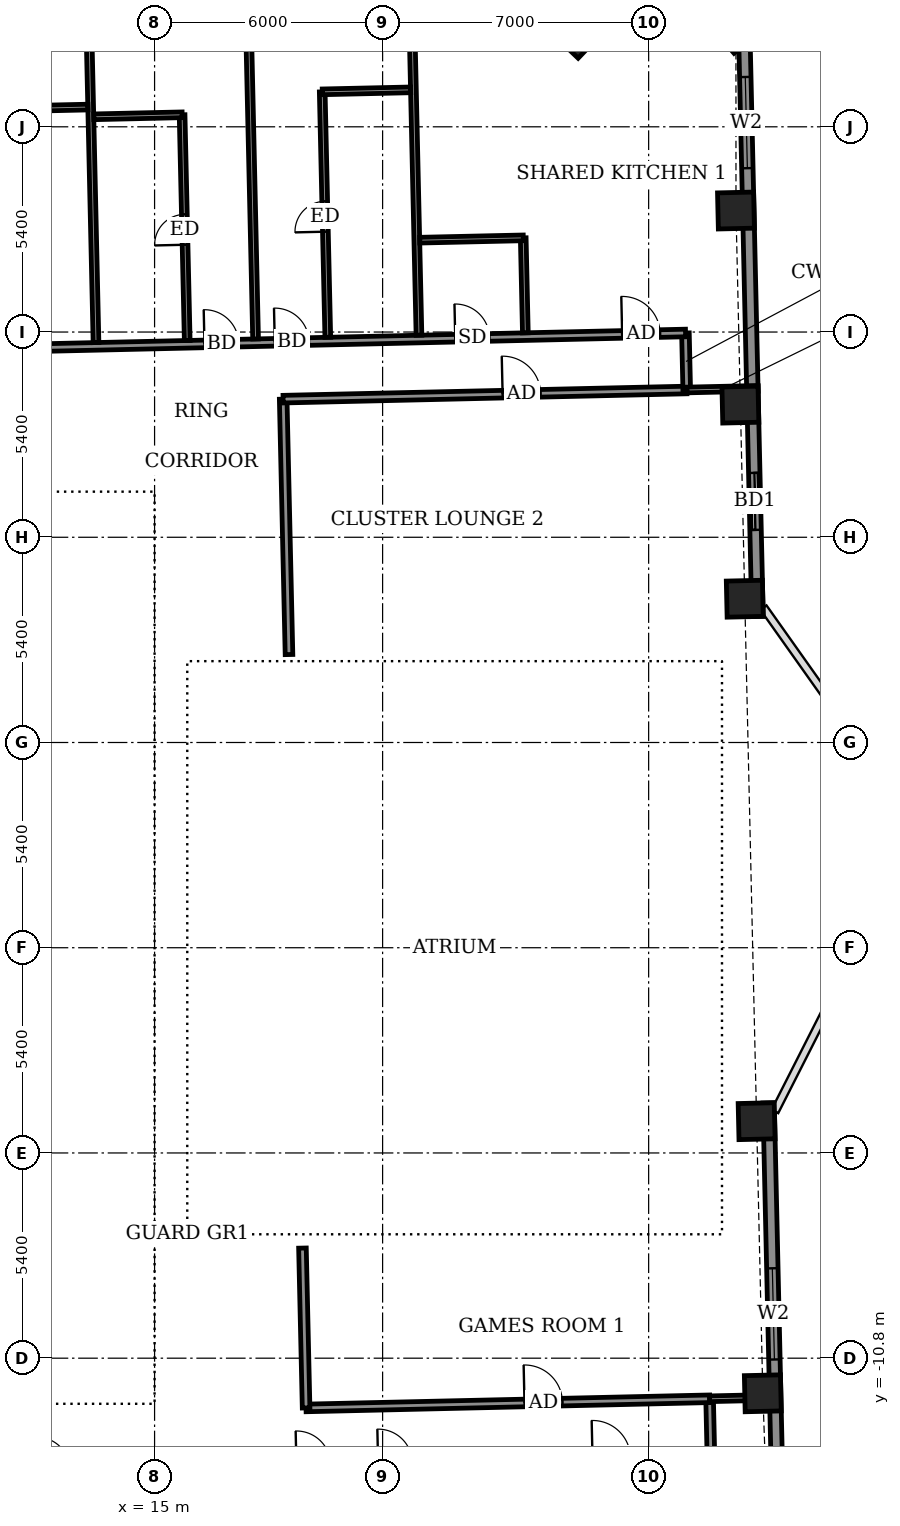
"""IFC4 building model, lengths in metres.
Left out: names, types, materials, properties, quantities, classifications, styles, units other than length and angle.
Written with IfcOpenShell. Run it as: python <this file> out.ifc"""

import sys

from ifc_helpers import new_model, si_unit, direction, frame, frame_2d, origin, origin_2d, place, context, subcontext, project, spatial, rectangle, extrude, element, fill, save


model = new_model("IFC4")
c1 = context("Model", 3, precision=1e-05, world=origin(), true_north=direction((0.0, 1.0)))
c2 = subcontext(c1, "Body", "Model", "MODEL_VIEW")
j1 = project(units=[si_unit("LENGTHUNIT", "METRE"), si_unit("PLANEANGLEUNIT", "RADIAN")], contexts=[c1])
p1 = place(None, origin())
s1 = spatial("IfcSite", under=j1, at=p1, CompositionType="ELEMENT")
p2 = place(p1, origin())
s2 = spatial("IfcBuilding", under=s1, at=p2, CompositionType="ELEMENT")
p3 = place(p2, frame((0.0, 0.0, 290.7)))
s3 = spatial("IfcBuildingStorey", under=s2, at=p3, CompositionType="ELEMENT", Elevation=290.7)
for number, where, z_axis, x_axis in (
    (1, (31.004, -11.724, -0.55), (0.0, 0.0, 1.0), (-0.023, 1.0, 0.0)),
    (2, (30.841, -4.564, -0.55), (0.0, 0.0, 1.0), (-0.023, 1.0, 0.0)),
    (3, (30.529, 9.183, -0.55), (0.0, 0.0, 1.0), (-0.023, 1.0, 0.0)),
    (4, (30.414, 14.29, -0.55), (0.0, 0.0, 1.0), (-0.023, 1.0, 0.0)),
    (5, (30.298, 19.397, -0.55), (0.0, 0.0, 1.0), (-0.023, 1.0, 0.0)),
    (6, (30.297, 24.205, -0.55), (0.0, 0.0, 1.0), (-0.652, 0.758, 0.0)),
    (7, (26.13, 24.077, -0.55), (0.0, 0.0, 1.0), (-0.723, 0.691, 0.0)),
):
    element("IfcColumn", number, at=place(p3, frame(where, z_axis=z_axis, x_axis=x_axis)), inside=s3, PredefinedType="COLUMN", context=c2, shape_type="SweptSolid", body=[
        extrude(rectangle(XDim=0.95, YDim=0.95, at=origin_2d()), origin(), (0.0, 0.0, 1.0), 3.6),
    ])
p4 = place(p3, frame((31.488, -18.727, 0.0), z_axis=(0.0, 0.0, 1.0), x_axis=(-0.022666132143, 0.999743090226, 0.0)))
e8 = element("IfcWall", 8, at=p4, inside=s3, PredefinedType="SOLIDWALL", context=c2, shape_type="SweptSolid", body=[
    extrude(rectangle(XDim=14.649, YDim=0.3, at=frame_2d((7.324, 0.0))), origin(), (0.0, 0.0, 1.0), 2.5),
])
p5 = place(p4, frame((2.915, 0.0, 0.0)))
e9 = element("IfcOpeningElement", 9, at=p5, cuts=e8, PredefinedType="OPENING", context=c2, shape_type="SweptSolid", body=[
    extrude(rectangle(XDim=1.5, YDim=2.4, at=frame_2d((0.75, 1.2))), frame((0.0, 0.16, 0.0), z_axis=(0.0, -1.0, 0.0), x_axis=(1.0, 0.0, 0.0)), (0.0, 0.0, 1.0), 0.32),
])
p6 = place(p4, frame((7.895, 0.0, 0.9)))
e10 = element("IfcOpeningElement", 10, at=p6, cuts=e8, PredefinedType="OPENING", context=c2, shape_type="SweptSolid", body=[
    extrude(rectangle(XDim=2.4, YDim=1.5, at=frame_2d((1.2, 0.75))), frame((0.0, 0.16, 0.0), z_axis=(0.0, -1.0, 0.0), x_axis=(1.0, 0.0, 0.0)), (0.0, 0.0, 1.0), 0.32),
])
p7 = place(p3, frame((30.865, 8.716, 0.0), z_axis=(0.0, 0.0, 1.0), x_axis=(-0.022682425427, 0.999742720692, 0.0)))
e11 = element("IfcWall", 11, at=p7, inside=s3, PredefinedType="SOLIDWALL", context=c2, shape_type="SweptSolid", body=[
    extrude(rectangle(XDim=15.65, YDim=0.3, at=frame_2d((7.825, 0.0))), origin(), (0.0, 0.0, 1.0), 2.55),
])
p8 = place(p7, frame((2.279, 0.0, 0.0)))
e12 = element("IfcOpeningElement", 12, at=p8, cuts=e11, PredefinedType="OPENING", context=c2, shape_type="SweptSolid", body=[
    extrude(rectangle(XDim=1.5, YDim=2.4, at=frame_2d((0.75, 1.2))), frame((0.0, 0.16, 0.0), z_axis=(0.0, -1.0, 0.0), x_axis=(1.0, 0.0, 0.0)), (0.0, 0.0, 1.0), 0.32),
])
p9 = place(p7, frame((11.798, 0.0, 0.9)))
e13 = element("IfcOpeningElement", 13, at=p9, cuts=e11, PredefinedType="OPENING", context=c2, shape_type="SweptSolid", body=[
    extrude(rectangle(XDim=2.4, YDim=1.5, at=frame_2d((1.2, 0.75))), frame((0.0, 0.16, 0.0), z_axis=(0.0, -1.0, 0.0), x_axis=(1.0, 0.0, 0.0)), (0.0, 0.0, 1.0), 0.32),
])
p10 = place(p3, frame((29.638, -13.368, 0.0), z_axis=(0.0, 0.0, 1.0), x_axis=(-0.022617910375, 0.999744182344, 0.0)))
e14 = element("IfcWall", 14, at=p10, inside=s3, PredefinedType="PARTITIONING", context=c2, shape_type="SweptSolid", body=[
    extrude(rectangle(XDim=1.5, YDim=0.2, at=frame_2d((0.75, 0.0))), origin(), (0.0, 0.0, 1.0), 3.05),
])
p11 = place(p3, frame((18.985, -12.109, 0.0), z_axis=(0.0, 0.0, 1.0), x_axis=(0.999742771882, 0.022680169073, 0.0)))
e15 = element("IfcWall", 15, at=p11, inside=s3, PredefinedType="PARTITIONING", context=c2, shape_type="SweptSolid", body=[
    extrude(rectangle(XDim=10.625, YDim=0.2, at=frame_2d((5.312, 0.0))), origin(), (0.0, 0.0, 1.0), 3.05),
])
p12 = place(p11, frame((5.75, 0.0, 0.0)))
e16 = element("IfcOpeningElement", 16, at=p12, cuts=e15, PredefinedType="OPENING", context=c2, shape_type="SweptSolid", body=[
    extrude(rectangle(XDim=1.0, YDim=2.1, at=frame_2d((0.5, 1.05))), frame((0.0, 0.11, 0.0), z_axis=(0.0, -1.0, 0.0), x_axis=(1.0, 0.0, 0.0)), (0.0, 0.0, 1.0), 0.22),
])
p13 = place(p3, frame((18.987, -12.109, 0.0), z_axis=(0.0, 0.0, 1.0), x_axis=(-0.022807092041, 0.999739884446, 0.0)))
e17 = element("IfcWall", 17, at=p13, inside=s3, PredefinedType="PARTITIONING", context=c2, shape_type="SweptSolid", body=[
    extrude(rectangle(XDim=4.207, YDim=0.2, at=frame_2d((2.104, 0.0))), origin(), (0.0, 0.0, 1.0), 3.05),
])
p14 = place(p3, frame((29.603, -11.868, 0.0), z_axis=(0.0, 0.0, 1.0), x_axis=(0.999741755729, 0.022724916977, 0.0)))
e18 = element("IfcWall", 18, at=p14, inside=s3, PredefinedType="PARTITIONING", context=c2, shape_type="SweptSolid", body=[
    extrude(rectangle(XDim=1.579, YDim=0.15, at=frame_2d((0.79, 0.0))), origin(), (0.0, 0.0, 1.0), 3.05),
])
p15 = place(p3, frame((18.537, 7.714, 0.0), z_axis=(0.0, 0.0, 1.0), x_axis=(-0.022773383809, 0.999740652864, 0.0)))
e19 = element("IfcWall", 19, at=p15, inside=s3, PredefinedType="PARTITIONING", context=c2, shape_type="SweptSolid", body=[
    extrude(rectangle(XDim=6.722, YDim=0.2, at=frame_2d((3.361, 0.0))), origin(), (0.0, 0.0, 1.0), 3.05),
])
p16 = place(p3, frame((18.382, 14.434, 0.0), z_axis=(0.0, 0.0, 1.0), x_axis=(0.999742819156, 0.02267808514, 0.0)))
e20 = element("IfcWall", 20, at=p16, inside=s3, PredefinedType="PARTITIONING", context=c2, shape_type="SweptSolid", body=[
    extrude(rectangle(XDim=10.625, YDim=0.2, at=frame_2d((5.313, 0.0))), origin(), (0.0, 0.0, 1.0), 3.05),
])
p17 = place(p16, frame((5.777, 0.0, 0.0)))
e21 = element("IfcOpeningElement", 21, at=p17, cuts=e20, PredefinedType="OPENING", context=c2, shape_type="SweptSolid", body=[
    extrude(rectangle(XDim=1.0, YDim=2.1, at=frame_2d((0.5, 1.05))), frame((0.0, 0.11, 0.0), z_axis=(0.0, -1.0, 0.0), x_axis=(1.0, 0.0, 0.0)), (0.0, 0.0, 1.0), 0.22),
])
p18 = place(p3, frame((29.002, 14.675, 0.0), z_axis=(0.0, 0.0, 1.0), x_axis=(-0.022617910375, 0.999744182344, 0.0)))
e22 = element("IfcWall", 22, at=p18, inside=s3, PredefinedType="PARTITIONING", context=c2, shape_type="SweptSolid", body=[
    extrude(rectangle(XDim=1.5, YDim=0.2, at=frame_2d((0.75, 0.0))), origin(), (0.0, 0.0, 1.0), 3.05),
])
p19 = place(p3, frame((29.005, 14.675, 0.0), z_axis=(0.0, 0.0, 1.0), x_axis=(0.999737243051, 0.022922583999, 0.0)))
e23 = element("IfcWall", 23, at=p19, inside=s3, PredefinedType="PARTITIONING", context=c2, shape_type="SweptSolid", body=[
    extrude(rectangle(XDim=1.875, YDim=0.15, at=frame_2d((0.937, 0.0))), origin(), (0.0, 0.0, 1.0), 2.55),
])
p20 = place(p3, frame((-26.401, 14.918, 0.0), z_axis=(0.0, 0.0, 1.0), x_axis=(0.99974239733, 0.022696673341, 0.0)))
e24 = element("IfcWall", 24, at=p20, inside=s3, PredefinedType="PARTITIONING", context=c2, shape_type="SweptSolid", body=[
    extrude(rectangle(XDim=55.386, YDim=0.2, at=frame_2d((27.693, 0.0))), origin(), (0.0, 0.0, 1.0), 3.05),
])
p21 = place(p20, frame((53.718, 0.0, 0.0)))
e25 = element("IfcOpeningElement", 25, at=p21, cuts=e24, PredefinedType="OPENING", context=c2, shape_type="SweptSolid", body=[
    extrude(rectangle(XDim=1.0, YDim=2.1, at=frame_2d((0.5, 1.05))), frame((0.0, 0.11, 0.0), z_axis=(0.0, -1.0, 0.0), x_axis=(1.0, 0.0, 0.0)), (0.0, 0.0, 1.0), 0.22),
])
p22 = place(p20, frame((49.325, 0.0, 0.0)))
e26 = element("IfcOpeningElement", 26, at=p22, cuts=e24, PredefinedType="OPENING", context=c2, shape_type="SweptSolid", body=[
    extrude(rectangle(XDim=0.9, YDim=2.1, at=frame_2d((0.45, 1.05))), frame((0.0, 0.11, 0.0), z_axis=(0.0, -1.0, 0.0), x_axis=(1.0, 0.0, 0.0)), (0.0, 0.0, 1.0), 0.22),
])
p23 = place(p20, frame((44.575, 0.0, 0.0)))
e27 = element("IfcOpeningElement", 27, at=p23, cuts=e24, PredefinedType="OPENING", context=c2, shape_type="SweptSolid", body=[
    extrude(rectangle(XDim=0.9, YDim=2.1, at=frame_2d((0.45, 1.05))), frame((0.0, 0.11, 0.0), z_axis=(0.0, -1.0, 0.0), x_axis=(1.0, 0.0, 0.0)), (0.0, 0.0, 1.0), 0.22),
])
p24 = place(p20, frame((42.725, 0.0, 0.0)))
e28 = element("IfcOpeningElement", 28, at=p24, cuts=e24, PredefinedType="OPENING", context=c2, shape_type="SweptSolid", body=[
    extrude(rectangle(XDim=0.9, YDim=2.1, at=frame_2d((0.45, 1.05))), frame((0.0, 0.11, 0.0), z_axis=(0.0, -1.0, 0.0), x_axis=(1.0, 0.0, 0.0)), (0.0, 0.0, 1.0), 0.22),
])
p25 = place(p20, frame((36.1, 0.0, 0.0)))
e29 = element("IfcOpeningElement", 29, at=p25, cuts=e24, PredefinedType="OPENING", context=c2, shape_type="SweptSolid", body=[
    extrude(rectangle(XDim=0.9, YDim=2.1, at=frame_2d((0.45, 1.05))), frame((0.0, 0.11, 0.0), z_axis=(0.0, -1.0, 0.0), x_axis=(1.0, 0.0, 0.0)), (0.0, 0.0, 1.0), 0.22),
])
p26 = place(p20, frame((34.25, 0.0, 0.0)))
e30 = element("IfcOpeningElement", 30, at=p26, cuts=e24, PredefinedType="OPENING", context=c2, shape_type="SweptSolid", body=[
    extrude(rectangle(XDim=0.9, YDim=2.1, at=frame_2d((0.45, 1.05))), frame((0.0, 0.11, 0.0), z_axis=(0.0, -1.0, 0.0), x_axis=(1.0, 0.0, 0.0)), (0.0, 0.0, 1.0), 0.22),
])
p27 = place(p20, frame((27.6, 0.0, 0.0)))
e31 = element("IfcOpeningElement", 31, at=p27, cuts=e24, PredefinedType="OPENING", context=c2, shape_type="SweptSolid", body=[
    extrude(rectangle(XDim=0.9, YDim=2.1, at=frame_2d((0.45, 1.05))), frame((0.0, 0.11, 0.0), z_axis=(0.0, -1.0, 0.0), x_axis=(1.0, 0.0, 0.0)), (0.0, 0.0, 1.0), 0.22),
])
p28 = place(p20, frame((25.775, 0.0, 0.0)))
e32 = element("IfcOpeningElement", 32, at=p28, cuts=e24, PredefinedType="OPENING", context=c2, shape_type="SweptSolid", body=[
    extrude(rectangle(XDim=0.9, YDim=2.1, at=frame_2d((0.45, 1.05))), frame((0.0, 0.11, 0.0), z_axis=(0.0, -1.0, 0.0), x_axis=(1.0, 0.0, 0.0)), (0.0, 0.0, 1.0), 0.22),
])
p29 = place(p20, frame((19.15, 0.0, 0.0)))
e33 = element("IfcOpeningElement", 33, at=p29, cuts=e24, PredefinedType="OPENING", context=c2, shape_type="SweptSolid", body=[
    extrude(rectangle(XDim=0.9, YDim=2.1, at=frame_2d((0.45, 1.05))), frame((0.0, 0.11, 0.0), z_axis=(0.0, -1.0, 0.0), x_axis=(1.0, 0.0, 0.0)), (0.0, 0.0, 1.0), 0.22),
])
p30 = place(p20, frame((17.3, 0.0, 0.0)))
e34 = element("IfcOpeningElement", 34, at=p30, cuts=e24, PredefinedType="OPENING", context=c2, shape_type="SweptSolid", body=[
    extrude(rectangle(XDim=0.9, YDim=2.1, at=frame_2d((0.45, 1.05))), frame((0.0, 0.11, 0.0), z_axis=(0.0, -1.0, 0.0), x_axis=(1.0, 0.0, 0.0)), (0.0, 0.0, 1.0), 0.22),
])
p31 = place(p20, frame((10.65, 0.0, 0.0)))
e35 = element("IfcOpeningElement", 35, at=p31, cuts=e24, PredefinedType="OPENING", context=c2, shape_type="SweptSolid", body=[
    extrude(rectangle(XDim=0.9, YDim=2.1, at=frame_2d((0.45, 1.05))), frame((0.0, 0.11, 0.0), z_axis=(0.0, -1.0, 0.0), x_axis=(1.0, 0.0, 0.0)), (0.0, 0.0, 1.0), 0.22),
])
p32 = place(p20, frame((8.8, 0.0, 0.0)))
e36 = element("IfcOpeningElement", 36, at=p32, cuts=e24, PredefinedType="OPENING", context=c2, shape_type="SweptSolid", body=[
    extrude(rectangle(XDim=0.9, YDim=2.1, at=frame_2d((0.45, 1.05))), frame((0.0, 0.11, 0.0), z_axis=(0.0, -1.0, 0.0), x_axis=(1.0, 0.0, 0.0)), (0.0, 0.0, 1.0), 0.22),
])
p33 = place(p20, frame((1.864, 0.0, 0.0)))
e37 = element("IfcOpeningElement", 37, at=p33, cuts=e24, PredefinedType="OPENING", context=c2, shape_type="SweptSolid", body=[
    extrude(rectangle(XDim=1.0, YDim=2.1, at=frame_2d((0.5, 1.05))), frame((0.0, 0.11, 0.0), z_axis=(0.0, -1.0, 0.0), x_axis=(1.0, 0.0, 0.0)), (0.0, 0.0, 1.0), 0.22),
])
p34 = place(p3, frame((13.459, 15.923, 0.0), z_axis=(0.0, 0.0, 1.0), x_axis=(-0.022661475803, 0.999743195783, 0.0)))
e38 = element("IfcWall", 38, at=p34, inside=s3, PredefinedType="PARTITIONING", context=c2, shape_type="SweptSolid", body=[
    extrude(rectangle(XDim=12.4, YDim=0.15, at=frame_2d((6.2, 0.0))), origin(), (0.0, 0.0, 1.0), 2.5),
])
p35 = place(p3, frame((15.859, 15.977, 0.0), z_axis=(0.0, 0.0, 1.0), x_axis=(-0.022685930195, 0.999742641169, 0.0)))
e39 = element("IfcWall", 39, at=p35, inside=s3, PredefinedType="PARTITIONING", context=c2, shape_type="SweptSolid", body=[
    extrude(rectangle(XDim=5.94, YDim=0.15, at=frame_2d((2.97, 0.0))), origin(), (0.0, 0.0, 1.0), 3.05),
])
p36 = place(p35, frame((2.52, 0.0, 0.0)))
e40 = element("IfcOpeningElement", 40, at=p36, cuts=e39, PredefinedType="OPENING", context=c2, shape_type="SweptSolid", body=[
    extrude(rectangle(XDim=0.8, YDim=2.1, at=frame_2d((0.4, 1.05))), frame((0.0, 0.085, 0.0), z_axis=(0.0, -1.0, 0.0), x_axis=(1.0, 0.0, 0.0)), (0.0, 0.0, 1.0), 0.17),
])
p37 = place(p3, frame((17.658, 16.018, 0.0), z_axis=(0.0, 0.0, 1.0), x_axis=(-0.022661475803, 0.999743195783, 0.0)))
e41 = element("IfcWall", 41, at=p37, inside=s3, PredefinedType="PARTITIONING", context=c2, shape_type="SweptSolid", body=[
    extrude(rectangle(XDim=12.4, YDim=0.15, at=frame_2d((6.2, 0.0))), origin(), (0.0, 0.0, 1.0), 2.5),
])
p38 = place(p3, frame((19.558, 16.061, 0.0), z_axis=(0.0, 0.0, 1.0), x_axis=(-0.022790087107, 0.999740272236, 0.0)))
e42 = element("IfcWall", 42, at=p38, inside=s3, PredefinedType="PARTITIONING", context=c2, shape_type="SweptSolid", body=[
    extrude(rectangle(XDim=6.46, YDim=0.15, at=frame_2d((3.23, 0.0))), origin(), (0.0, 0.0, 1.0), 3.05),
])
p39 = place(p38, frame((2.78, 0.0, 0.0)))
e43 = element("IfcOpeningElement", 43, at=p39, cuts=e42, PredefinedType="OPENING", context=c2, shape_type="SweptSolid", body=[
    extrude(rectangle(XDim=0.8, YDim=2.1, at=frame_2d((0.4, 1.05))), frame((0.0, 0.085, 0.0), z_axis=(0.0, -1.0, 0.0), x_axis=(1.0, 0.0, 0.0)), (0.0, 0.0, 1.0), 0.17),
])
p40 = place(p3, frame((21.957, 16.116, 0.0), z_axis=(0.0, 0.0, 1.0), x_axis=(-0.022663260168, 0.999743155335, 0.0)))
e44 = element("IfcWall", 44, at=p40, inside=s3, PredefinedType="PARTITIONING", context=c2, shape_type="SweptSolid", body=[
    extrude(rectangle(XDim=12.399, YDim=0.15, at=frame_2d((6.2, 0.0))), origin(), (0.0, 0.0, 1.0), 2.55),
])
p41 = place(p3, frame((24.756, 16.179, 0.0), z_axis=(0.0, 0.0, 1.0), x_axis=(-0.022464044534, 0.999747651512, 0.0)))
e45 = element("IfcWall", 45, at=p41, inside=s3, PredefinedType="PARTITIONING", context=c2, shape_type="SweptSolid", body=[
    extrude(rectangle(XDim=2.5, YDim=0.15, at=frame_2d((1.25, 0.0))), origin(), (0.0, 0.0, 1.0), 3.05),
])
p42 = place(p3, frame((21.977, 18.617, 0.0), z_axis=(0.0, 0.0, 1.0), x_axis=(0.999749227207, 0.022393809408, 0.0)))
e46 = element("IfcWall", 46, at=p42, inside=s3, PredefinedType="PARTITIONING", context=c2, shape_type="SweptSolid", body=[
    extrude(rectangle(XDim=2.726, YDim=0.15, at=frame_2d((1.363, 0.0))), origin(), (0.0, 0.0, 1.0), 3.05),
])
for number, where, z_axis, x_axis in (
    (47, (13.401, 21.863, 0.0), (0.0, 0.0, 1.0), (1.0, 0.023, 0.0)),
    (48, (10.921, 22.067, 0.0), (0.0, 0.0, 1.0), (1.0, 0.022, 0.0)),
):
    element("IfcWall", number, at=place(p3, frame(where, z_axis=z_axis, x_axis=x_axis)), inside=s3, PredefinedType="PARTITIONING", context=c2, shape_type="SweptSolid", body=[
        extrude(rectangle(XDim=2.326, YDim=0.15, at=frame_2d((1.163, 0.0))), origin(), (0.0, 0.0, 1.0), 3.05),
    ])
p43 = place(p3, frame((19.413, 22.52, 0.0), z_axis=(0.0, 0.0, 1.0), x_axis=(0.999749954681, 0.022361308448, 0.0)))
e49 = element("IfcWall", 49, at=p43, inside=s3, PredefinedType="PARTITIONING", context=c2, shape_type="SweptSolid", body=[
    extrude(rectangle(XDim=2.325, YDim=0.15, at=frame_2d((1.163, 0.0))), origin(), (0.0, 0.0, 1.0), 3.05),
])
for number, where, z_axis, x_axis in (
    (50, (-14.5, -11.15, 0.0), (0.0, 0.0, 1.0), (1.0, 0.0, 0.0)),
    (51, (-14.5, 11.15, 0.0), (0.0, 0.0, 1.0), (1.0, 0.0, 0.0)),
):
    element("IfcWall", number, at=place(p3, frame(where, z_axis=z_axis, x_axis=x_axis)), inside=s3, PredefinedType="SHEAR", context=c2, shape_type="SweptSolid", body=[
        extrude(rectangle(XDim=29.0, YDim=0.7, at=frame_2d((14.5, 0.0))), origin(), (0.0, 0.0, 1.0), 3.6),
    ])
p44 = place(p3, frame((14.15, -10.8, 0.0), z_axis=(0.0, 0.0, 1.0), x_axis=(0.0, 1.0, 0.0)))
e52 = element("IfcWall", 52, at=p44, inside=s3, PredefinedType="SHEAR", context=c2, shape_type="SweptSolid", body=[
    extrude(rectangle(XDim=21.6, YDim=0.7, at=frame_2d((10.8, 0.0))), origin(), (0.0, 0.0, 1.0), 3.6),
])
p45 = place(p44, frame((1.2, 0.0, 0.0)))
e53 = element("IfcOpeningElement", 53, at=p45, cuts=e52, PredefinedType="OPENING", context=c2, shape_type="SweptSolid", body=[
    extrude(rectangle(XDim=1.2, YDim=2.1, at=frame_2d((0.6, 1.05))), frame((0.0, 0.36, 0.0), z_axis=(0.0, -1.0, 0.0), x_axis=(1.0, 0.0, 0.0)), (0.0, 0.0, 1.0), 0.72),
])
p46 = place(p6, origin())
e54 = element("IfcWindow", 54, at=p46, inside=s3, PartitioningType="DOUBLE_PANEL_VERTICAL", PredefinedType="WINDOW", context=c2, shape_type="SweptSolid", body=[
    extrude(rectangle(XDim=2.4, YDim=1.5, at=frame_2d((1.2, 0.75))), frame((0.0, 0.03, 0.0), z_axis=(0.0, -1.0, 0.0), x_axis=(1.0, 0.0, 0.0)), (0.0, 0.0, 1.0), 0.06),
])
fill(e10, e54)
p47 = place(p8, origin())
e55 = element("IfcDoor", 55, at=p47, inside=s3, OperationType="SLIDING_TO_LEFT", PredefinedType="DOOR", context=c2, shape_type="SweptSolid", body=[
    extrude(rectangle(XDim=1.5, YDim=2.4, at=frame_2d((0.75, 1.2))), frame((0.0, 0.025, 0.0), z_axis=(0.0, -1.0, 0.0), x_axis=(1.0, 0.0, 0.0)), (0.0, 0.0, 1.0), 0.05),
])
fill(e12, e55)
p48 = place(p9, origin())
e56 = element("IfcWindow", 56, at=p48, inside=s3, PartitioningType="DOUBLE_PANEL_VERTICAL", PredefinedType="WINDOW", context=c2, shape_type="SweptSolid", body=[
    extrude(rectangle(XDim=2.4, YDim=1.5, at=frame_2d((1.2, 0.75))), frame((0.0, 0.03, 0.0), z_axis=(0.0, -1.0, 0.0), x_axis=(1.0, 0.0, 0.0)), (0.0, 0.0, 1.0), 0.06),
])
fill(e13, e56)
p49 = place(p12, origin())
e57 = element("IfcDoor", 57, at=p49, inside=s3, OperationType="SINGLE_SWING_LEFT", PredefinedType="DOOR", context=c2, shape_type="SweptSolid", body=[
    extrude(rectangle(XDim=1.0, YDim=2.1, at=frame_2d((0.5, 1.05))), frame((0.0, 0.025, 0.0), z_axis=(0.0, -1.0, 0.0), x_axis=(1.0, 0.0, 0.0)), (0.0, 0.0, 1.0), 0.05),
])
fill(e16, e57)
p50 = place(p17, origin())
e58 = element("IfcDoor", 58, at=p50, inside=s3, OperationType="SINGLE_SWING_RIGHT", PredefinedType="DOOR", context=c2, shape_type="SweptSolid", body=[
    extrude(rectangle(XDim=1.0, YDim=2.1, at=frame_2d((0.5, 1.05))), frame((0.0, 0.025, 0.0), z_axis=(0.0, -1.0, 0.0), x_axis=(1.0, 0.0, 0.0)), (0.0, 0.0, 1.0), 0.05),
])
fill(e21, e58)
p51 = place(p21, origin())
e59 = element("IfcDoor", 59, at=p51, inside=s3, OperationType="SINGLE_SWING_LEFT", PredefinedType="DOOR", context=c2, shape_type="SweptSolid", body=[
    extrude(rectangle(XDim=1.0, YDim=2.1, at=frame_2d((0.5, 1.05))), frame((0.0, 0.025, 0.0), z_axis=(0.0, -1.0, 0.0), x_axis=(1.0, 0.0, 0.0)), (0.0, 0.0, 1.0), 0.05),
])
fill(e25, e59)
p52 = place(p22, origin())
e60 = element("IfcDoor", 60, at=p52, inside=s3, OperationType="SINGLE_SWING_RIGHT", PredefinedType="DOOR", context=c2, shape_type="SweptSolid", body=[
    extrude(rectangle(XDim=0.9, YDim=2.1, at=frame_2d((0.45, 1.05))), frame((0.0, 0.025, 0.0), z_axis=(0.0, -1.0, 0.0), x_axis=(1.0, 0.0, 0.0)), (0.0, 0.0, 1.0), 0.05),
])
fill(e26, e60)
p53 = place(p23, origin())
e61 = element("IfcDoor", 61, at=p53, inside=s3, OperationType="SINGLE_SWING_RIGHT", PredefinedType="DOOR", context=c2, shape_type="SweptSolid", body=[
    extrude(rectangle(XDim=0.9, YDim=2.1, at=frame_2d((0.45, 1.05))), frame((0.0, 0.025, 0.0), z_axis=(0.0, -1.0, 0.0), x_axis=(1.0, 0.0, 0.0)), (0.0, 0.0, 1.0), 0.05),
])
fill(e27, e61)
p54 = place(p39, origin())
e62 = element("IfcDoor", 62, at=p54, inside=s3, OperationType="SINGLE_SWING_RIGHT", PredefinedType="DOOR", context=c2, shape_type="SweptSolid", body=[
    extrude(rectangle(XDim=0.8, YDim=2.1, at=frame_2d((0.4, 1.05))), frame((0.0, 0.025, 0.0), z_axis=(0.0, -1.0, 0.0), x_axis=(1.0, 0.0, 0.0)), (0.0, 0.0, 1.0), 0.05),
])
fill(e43, e62)
p55 = place(p24, origin())
e63 = element("IfcDoor", 63, at=p55, inside=s3, OperationType="SINGLE_SWING_LEFT", PredefinedType="DOOR", context=c2, shape_type="SweptSolid", body=[
    extrude(rectangle(XDim=0.9, YDim=2.1, at=frame_2d((0.45, 1.05))), frame((0.0, 0.025, 0.0), z_axis=(0.0, -1.0, 0.0), x_axis=(1.0, 0.0, 0.0)), (0.0, 0.0, 1.0), 0.05),
])
fill(e28, e63)
p56 = place(p36, origin())
e64 = element("IfcDoor", 64, at=p56, inside=s3, OperationType="SINGLE_SWING_LEFT", PredefinedType="DOOR", context=c2, shape_type="SweptSolid", body=[
    extrude(rectangle(XDim=0.8, YDim=2.1, at=frame_2d((0.4, 1.05))), frame((0.0, 0.025, 0.0), z_axis=(0.0, -1.0, 0.0), x_axis=(1.0, 0.0, 0.0)), (0.0, 0.0, 1.0), 0.05),
])
fill(e40, e64)
p57 = place(p45, origin())
e65 = element("IfcDoor", 65, at=p57, inside=s3, OperationType="DOUBLE_DOOR_SINGLE_SWING", PredefinedType="DOOR", context=c2, shape_type="SweptSolid", body=[
    extrude(rectangle(XDim=1.2, YDim=2.1, at=frame_2d((0.6, 1.05))), frame((0.0, 0.025, 0.0), z_axis=(0.0, -1.0, 0.0), x_axis=(1.0, 0.0, 0.0)), (0.0, 0.0, 1.0), 0.05),
])
fill(e53, e65)
save(model, sys.argv[1])
